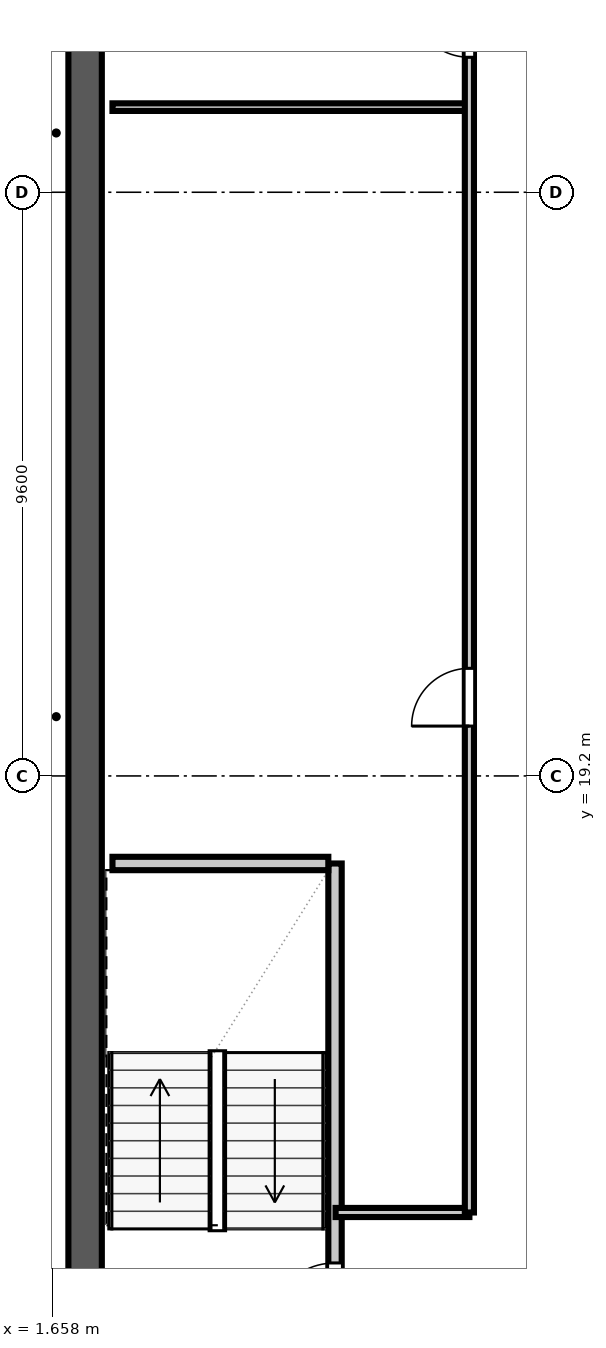
"""IFC4 building model, lengths in metres.
Left out: names, types, materials, properties, quantities, classifications, styles, units other than length and angle.
Written with IfcOpenShell. Run it as: python <this file> out.ifc"""

import sys

from ifc_helpers import new_model, si_unit, direction, frame, frame_2d, origin, place, context, subcontext, project, spatial, rectangle, extrude, element, fill, save


model = new_model("IFC4")
c1 = context("Model", 3, precision=1e-05, world=origin(), true_north=direction((0.0, 1.0)))
c2 = subcontext(c1, "Body", "Model", "MODEL_VIEW")
j1 = project(units=[si_unit("LENGTHUNIT", "METRE"), si_unit("PLANEANGLEUNIT", "RADIAN")], contexts=[c1])
p1 = place(None, origin())
s1 = spatial("IfcSite", under=j1, at=p1, CompositionType="ELEMENT")
p2 = place(p1, origin())
s2 = spatial("IfcBuilding", under=s1, at=p2, CompositionType="ELEMENT")
p3 = place(p2, frame((0.0, 0.0, 273.4)))
s3 = spatial("IfcBuildingStorey", under=s2, at=p3, CompositionType="ELEMENT", Elevation=273.4)
p4 = place(p3, frame((2.2, 9.325, 0.0), z_axis=(0.0, 0.0, 1.0), x_axis=(0.0, 1.0, 0.0)))
e1 = element("IfcWall", 1, at=p4, inside=s3, PredefinedType="SHEAR", context=c2, shape_type="SweptSolid", body=[
    extrude(rectangle(XDim=38.95, YDim=0.55, at=frame_2d((19.475, 0.0))), origin(), (0.0, 0.0, 1.0), 3.54),
])
p5 = place(p3, frame((6.31, 9.95, 0.0), z_axis=(0.0, 0.0, 1.0), x_axis=(0.0, 1.0, 0.0)))
e2 = element("IfcWall", 2, at=p5, inside=s3, PredefinedType="SOLIDWALL", context=c2, shape_type="SweptSolid", body=[
    extrude(rectangle(XDim=7.81, YDim=0.22, at=frame_2d((3.905, 0.0))), origin(), (0.0, 0.0, 1.0), 3.54),
])
p6 = place(p5, frame((0.14, 0.0, 0.0)))
e3 = element("IfcOpeningElement", 3, at=p6, cuts=e2, PredefinedType="OPENING", context=c2, shape_type="SweptSolid", body=[
    extrude(rectangle(XDim=1.1, YDim=2.2, at=frame_2d((0.55, 1.1))), frame((0.0, 0.122, 0.0), z_axis=(0.0, -1.0, 0.0), x_axis=(1.0, 0.0, 0.0)), (0.0, 0.0, 1.0), 0.244),
])
p7 = place(p3, frame((2.65, 17.76, 0.0), z_axis=(0.0, 0.0, 1.0), x_axis=(1.0, 0.0, 0.0)))
e4 = element("IfcWall", 4, at=p7, inside=s3, PredefinedType="SOLIDWALL", context=c2, shape_type="SweptSolid", body=[
    extrude(rectangle(XDim=3.55, YDim=0.22, at=frame_2d((1.775, 0.0))), origin(), (0.0, 0.0, 1.0), 3.54),
])
p8 = place(p3, frame((6.32, 12.02, 0.0), z_axis=(0.0, 0.0, 1.0), x_axis=(1.0, 0.0, 0.0)))
e5 = element("IfcWall", 5, at=p8, inside=s3, PredefinedType="PARTITIONING", context=c2, shape_type="SweptSolid", body=[
    extrude(rectangle(XDim=2.2, YDim=0.15, at=frame_2d((1.1, 0.0))), origin(), (0.0, 0.0, 1.0), 3.54),
])
p9 = place(p3, frame((2.65, 30.2, 0.0), z_axis=(0.0, 0.0, 1.0), x_axis=(1.0, 0.0, 0.0)))
e6 = element("IfcWall", 6, at=p9, inside=s3, PredefinedType="PARTITIONING", context=c2, shape_type="SweptSolid", body=[
    extrude(rectangle(XDim=5.87, YDim=0.125, at=frame_2d((2.935, 0.0))), origin(), (0.0, 0.0, 1.0), 3.54),
])
p10 = place(p3, frame((8.52, 12.02, 0.0), z_axis=(0.0, 0.0, 1.0), x_axis=(0.0, 1.0, 0.0)))
e7 = element("IfcWall", 7, at=p10, inside=s3, PredefinedType="PARTITIONING", context=c2, shape_type="SweptSolid", body=[
    extrude(rectangle(XDim=24.76, YDim=0.15, at=frame_2d((12.38, 0.0))), origin(), (0.0, 0.0, 1.0), 3.54),
])
p11 = place(p10, frame((8.0, 0.0, 0.0)))
e8 = element("IfcOpeningElement", 8, at=p11, cuts=e7, PredefinedType="OPENING", context=c2, shape_type="SweptSolid", body=[
    extrude(rectangle(XDim=0.95, YDim=2.15, at=frame_2d((0.475, 1.075))), frame((0.0, 0.087, 0.0), z_axis=(0.0, -1.0, 0.0), x_axis=(1.0, 0.0, 0.0)), (0.0, 0.0, 1.0), 0.174),
])
p12 = place(p10, frame((19.0, 0.0, 0.0)))
e9 = element("IfcOpeningElement", 9, at=p12, cuts=e7, PredefinedType="OPENING", context=c2, shape_type="SweptSolid", body=[
    extrude(rectangle(XDim=0.95, YDim=2.15, at=frame_2d((0.475, 1.075))), frame((0.0, 0.087, 0.0), z_axis=(0.0, -1.0, 0.0), x_axis=(1.0, 0.0, 0.0)), (0.0, 0.0, 1.0), 0.174),
])
p13 = place(p6, origin())
e10 = element("IfcDoor", 10, at=p13, inside=s3, OperationType="SINGLE_SWING_LEFT", PredefinedType="DOOR", context=c2, shape_type="SweptSolid", body=[
    extrude(rectangle(XDim=1.1, YDim=2.2, at=frame_2d((0.55, 1.1))), frame((0.0, 0.025, 0.0), z_axis=(0.0, -1.0, 0.0), x_axis=(1.0, 0.0, 0.0)), (0.0, 0.0, 1.0), 0.05),
])
fill(e3, e10)
p14 = place(p11, origin())
e11 = element("IfcDoor", 11, at=p14, inside=s3, OperationType="SINGLE_SWING_LEFT", PredefinedType="DOOR", context=c2, shape_type="SweptSolid", body=[
    extrude(rectangle(XDim=0.95, YDim=2.15, at=frame_2d((0.475, 1.075))), frame((0.0, 0.025, 0.0), z_axis=(0.0, -1.0, 0.0), x_axis=(1.0, 0.0, 0.0)), (0.0, 0.0, 1.0), 0.05),
])
fill(e8, e11)
p15 = place(p12, origin())
e12 = element("IfcDoor", 12, at=p15, inside=s3, OperationType="SINGLE_SWING_RIGHT", PredefinedType="DOOR", context=c2, shape_type="SweptSolid", body=[
    extrude(rectangle(XDim=0.95, YDim=2.15, at=frame_2d((0.475, 1.075))), frame((0.0, 0.025, 0.0), z_axis=(0.0, -1.0, 0.0), x_axis=(1.0, 0.0, 0.0)), (0.0, 0.0, 1.0), 0.05),
])
fill(e9, e12)
save(model, sys.argv[1])
